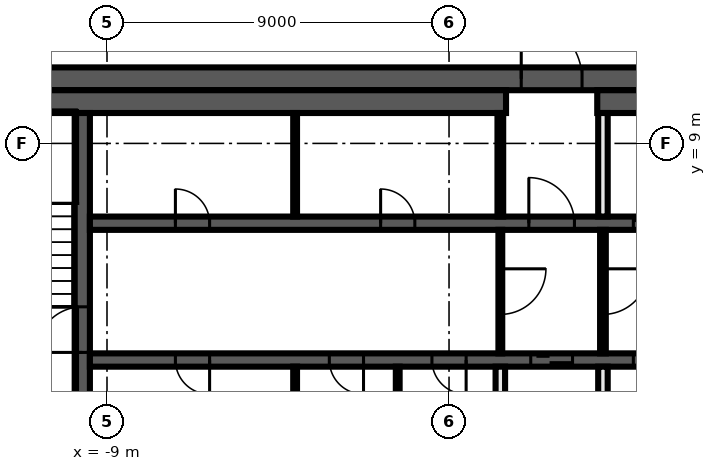
"""IFC4 building model, lengths in metres.
Left out: names, types, materials, properties, quantities, classifications, styles, units other than length and angle.
Written with IfcOpenShell. Run it as: python <this file> out.ifc"""

import sys

from ifc_helpers import new_model, si_unit, direction, frame, frame_2d, origin, place, context, subcontext, project, spatial, rectangle, extrude, element, fill, save


model = new_model("IFC4")
c1 = context("Model", 3, precision=1e-05, world=origin(), true_north=direction((0.0, 1.0)))
c2 = subcontext(c1, "Body", "Model", "MODEL_VIEW")
j1 = project(units=[si_unit("LENGTHUNIT", "METRE"), si_unit("PLANEANGLEUNIT", "RADIAN")], contexts=[c1])
p1 = place(None, origin())
s1 = spatial("IfcSite", under=j1, at=p1, CompositionType="ELEMENT")
p2 = place(p1, origin())
s2 = spatial("IfcBuilding", under=s1, at=p2, CompositionType="ELEMENT")
p3 = place(p2, frame((0.0, 0.0, 353.0)))
s3 = spatial("IfcBuildingStorey", under=s2, at=p3, CompositionType="ELEMENT", Elevation=353.0)
p4 = place(p3, frame((-14.0, 10.7, 0.0), z_axis=(0.0, 0.0, 1.0), x_axis=(1.0, 0.0, 0.0)))
e1 = element("IfcWall", 1, at=p4, inside=s3, PredefinedType="SHEAR", context=c2, shape_type="SweptSolid", body=[
    extrude(rectangle(XDim=28.0, YDim=0.6, at=frame_2d((14.0, 0.0))), origin(), (0.0, 0.0, 1.0), 5.6),
])
p5 = place(p4, frame((15.9, 0.0, 0.0)))
e2 = element("IfcOpeningElement", 2, at=p5, cuts=e1, PredefinedType="OPENING", context=c2, shape_type="SweptSolid", body=[
    extrude(rectangle(XDim=1.6, YDim=2.1, at=frame_2d((0.8, 1.05))), frame((0.0, 0.31, 0.0), z_axis=(0.0, -1.0, 0.0), x_axis=(1.0, 0.0, 0.0)), (0.0, 0.0, 1.0), 0.62),
])
p6 = place(p3, frame((-13.4, 10.1, 0.0), z_axis=(0.0, 0.0, 1.0), x_axis=(1.0, 0.0, 0.0)))
e3 = element("IfcWall", 3, at=p6, inside=s3, PredefinedType="SHEAR", context=c2, shape_type="SweptSolid", body=[
    extrude(rectangle(XDim=14.9, YDim=0.6, at=frame_2d((7.45, 0.0))), origin(), (0.0, 0.0, 1.0), 5.6),
])
p7 = place(p3, frame((3.9, 10.1, 0.0), z_axis=(0.0, 0.0, 1.0), x_axis=(1.0, 0.0, 0.0)))
e4 = element("IfcWall", 4, at=p7, inside=s3, PredefinedType="SHEAR", context=c2, shape_type="SweptSolid", body=[
    extrude(rectangle(XDim=9.5, YDim=0.6, at=frame_2d((4.75, 0.0))), origin(), (0.0, 0.0, 1.0), 5.6),
])
p8 = place(p3, frame((-9.65, 2.3, 0.0), z_axis=(0.0, 0.0, 1.0), x_axis=(0.0, 1.0, 0.0)))
e5 = element("IfcWall", 5, at=p8, inside=s3, PredefinedType="SHEAR", context=c2, shape_type="SweptSolid", body=[
    extrude(rectangle(XDim=7.5, YDim=0.4, at=frame_2d((3.75, 0.0))), origin(), (0.0, 0.0, 1.0), 5.6),
])
p9 = place(p8, frame((1.2, 0.0, 0.0)))
e6 = element("IfcOpeningElement", 6, at=p9, cuts=e5, PredefinedType="OPENING", context=c2, shape_type="SweptSolid", body=[
    extrude(rectangle(XDim=1.2, YDim=2.1, at=frame_2d((0.6, 1.05))), frame((0.0, 0.21, 0.0), z_axis=(0.0, -1.0, 0.0), x_axis=(1.0, 0.0, 0.0)), (0.0, 0.0, 1.0), 0.42),
])
p10 = place(p3, frame((-9.45, 6.9, 0.0), z_axis=(0.0, 0.0, 1.0), x_axis=(1.0, 0.0, 0.0)))
e7 = element("IfcWall", 7, at=p10, inside=s3, PredefinedType="SHEAR", context=c2, shape_type="SweptSolid", body=[
    extrude(rectangle(XDim=18.9, YDim=0.35, at=frame_2d((9.45, 0.0))), origin(), (0.0, 0.0, 1.0), 5.6),
])
p11 = place(p10, frame((11.55, 0.0, 0.0)))
e8 = element("IfcOpeningElement", 8, at=p11, cuts=e7, PredefinedType="OPENING", context=c2, shape_type="SweptSolid", body=[
    extrude(rectangle(XDim=1.2, YDim=2.1, at=frame_2d((0.6, 1.05))), frame((0.0, 0.185, 0.0), z_axis=(0.0, -1.0, 0.0), x_axis=(1.0, 0.0, 0.0)), (0.0, 0.0, 1.0), 0.37),
])
p12 = place(p10, frame((14.3, 0.0, 0.0)))
e9 = element("IfcOpeningElement", 9, at=p12, cuts=e7, PredefinedType="OPENING", context=c2, shape_type="SweptSolid", body=[
    extrude(rectangle(XDim=1.1, YDim=2.1, at=frame_2d((0.55, 1.05))), frame((0.0, 0.185, 0.0), z_axis=(0.0, -1.0, 0.0), x_axis=(1.0, 0.0, 0.0)), (0.0, 0.0, 1.0), 0.37),
])
p13 = place(p10, frame((17.0, 0.0, 0.0)))
e10 = element("IfcOpeningElement", 10, at=p13, cuts=e7, PredefinedType="OPENING", context=c2, shape_type="SweptSolid", body=[
    extrude(rectangle(XDim=1.1, YDim=2.1, at=frame_2d((0.55, 1.05))), frame((0.0, 0.185, 0.0), z_axis=(0.0, -1.0, 0.0), x_axis=(1.0, 0.0, 0.0)), (0.0, 0.0, 1.0), 0.37),
])
p14 = place(p10, frame((2.25, 0.0, 0.0)))
e11 = element("IfcOpeningElement", 11, at=p14, cuts=e7, PredefinedType="OPENING", context=c2, shape_type="SweptSolid", body=[
    extrude(rectangle(XDim=0.9, YDim=2.1, at=frame_2d((0.45, 1.05))), frame((0.0, 0.185, 0.0), z_axis=(0.0, -1.0, 0.0), x_axis=(1.0, 0.0, 0.0)), (0.0, 0.0, 1.0), 0.37),
])
p15 = place(p10, frame((7.65, 0.0, 0.0)))
e12 = element("IfcOpeningElement", 12, at=p15, cuts=e7, PredefinedType="OPENING", context=c2, shape_type="SweptSolid", body=[
    extrude(rectangle(XDim=0.9, YDim=2.1, at=frame_2d((0.45, 1.05))), frame((0.0, 0.185, 0.0), z_axis=(0.0, -1.0, 0.0), x_axis=(1.0, 0.0, 0.0)), (0.0, 0.0, 1.0), 0.37),
])
p16 = place(p3, frame((9.45, 3.3, 0.0), z_axis=(0.0, 0.0, 1.0), x_axis=(-1.0, 0.0, 0.0)))
e13 = element("IfcWall", 13, at=p16, inside=s3, PredefinedType="SHEAR", context=c2, shape_type="SweptSolid", body=[
    extrude(rectangle(XDim=18.9, YDim=0.35, at=frame_2d((9.45, 0.0))), origin(), (0.0, 0.0, 1.0), 5.6),
])
p17 = place(p16, frame((6.2, 0.0, 0.0)))
e14 = element("IfcOpeningElement", 14, at=p17, cuts=e13, PredefinedType="OPENING", context=c2, shape_type="SweptSolid", body=[
    extrude(rectangle(XDim=1.1, YDim=2.1, at=frame_2d((0.55, 1.05))), frame((0.0, 0.185, 0.0), z_axis=(0.0, -1.0, 0.0), x_axis=(1.0, 0.0, 0.0)), (0.0, 0.0, 1.0), 0.37),
])
p18 = place(p16, frame((3.5, 0.0, 0.0)))
e15 = element("IfcOpeningElement", 15, at=p18, cuts=e13, PredefinedType="OPENING", context=c2, shape_type="SweptSolid", body=[
    extrude(rectangle(XDim=1.1, YDim=2.1, at=frame_2d((0.55, 1.05))), frame((0.0, 0.185, 0.0), z_axis=(0.0, -1.0, 0.0), x_axis=(1.0, 0.0, 0.0)), (0.0, 0.0, 1.0), 0.37),
])
p19 = place(p16, frame((0.9, 0.0, 0.0)))
e16 = element("IfcOpeningElement", 16, at=p19, cuts=e13, PredefinedType="OPENING", context=c2, shape_type="SweptSolid", body=[
    extrude(rectangle(XDim=0.9, YDim=2.1, at=frame_2d((0.45, 1.05))), frame((0.0, 0.185, 0.0), z_axis=(0.0, -1.0, 0.0), x_axis=(1.0, 0.0, 0.0)), (0.0, 0.0, 1.0), 0.37),
])
p20 = place(p16, frame((15.75, 0.0, 0.0)))
e17 = element("IfcOpeningElement", 17, at=p20, cuts=e13, PredefinedType="OPENING", context=c2, shape_type="SweptSolid", body=[
    extrude(rectangle(XDim=0.9, YDim=2.1, at=frame_2d((0.45, 1.05))), frame((0.0, 0.185, 0.0), z_axis=(0.0, -1.0, 0.0), x_axis=(1.0, 0.0, 0.0)), (0.0, 0.0, 1.0), 0.37),
])
p21 = place(p16, frame((11.7, 0.0, 0.0)))
e18 = element("IfcOpeningElement", 18, at=p21, cuts=e13, PredefinedType="OPENING", context=c2, shape_type="SweptSolid", body=[
    extrude(rectangle(XDim=0.9, YDim=2.1, at=frame_2d((0.45, 1.05))), frame((0.0, 0.185, 0.0), z_axis=(0.0, -1.0, 0.0), x_axis=(1.0, 0.0, 0.0)), (0.0, 0.0, 1.0), 0.37),
])
p22 = place(p16, frame((9.0, 0.0, 0.0)))
e19 = element("IfcOpeningElement", 19, at=p22, cuts=e13, PredefinedType="OPENING", context=c2, shape_type="SweptSolid", body=[
    extrude(rectangle(XDim=0.9, YDim=2.1, at=frame_2d((0.45, 1.05))), frame((0.0, 0.185, 0.0), z_axis=(0.0, -1.0, 0.0), x_axis=(1.0, 0.0, 0.0)), (0.0, 0.0, 1.0), 0.37),
])
p23 = place(p3, frame((4.05, 6.725, 0.0), z_axis=(0.0, 0.0, 1.0), x_axis=(0.0, -1.0, 0.0)))
e20 = element("IfcWall", 20, at=p23, inside=s3, PredefinedType="PARTITIONING", context=c2, shape_type="SweptSolid", body=[
    extrude(rectangle(XDim=3.25, YDim=0.15, at=frame_2d((1.625, 0.0))), origin(), (0.0, 0.0, 1.0), 5.6),
])
p24 = place(p23, frame((1.025, 0.0, 0.0)))
e21 = element("IfcOpeningElement", 21, at=p24, cuts=e20, PredefinedType="OPENING", context=c2, shape_type="SweptSolid", body=[
    extrude(rectangle(XDim=1.2, YDim=2.1, at=frame_2d((0.6, 1.05))), frame((0.0, 0.085, 0.0), z_axis=(0.0, -1.0, 0.0), x_axis=(1.0, 0.0, 0.0)), (0.0, 0.0, 1.0), 0.17),
])
for number, where, z_axis, x_axis in (
    (22, (4.05, 0.4, 0.0), (0.0, 0.0, 1.0), (0.0, 1.0, 0.0)),
    (23, (4.05, 7.075, 0.0), (0.0, 0.0, 1.0), (0.0, 1.0, 0.0)),
):
    element("IfcWall", number, at=place(p3, frame(where, z_axis=z_axis, x_axis=x_axis)), inside=s3, PredefinedType="SOLIDWALL", context=c2, shape_type="SweptSolid", body=[
        extrude(rectangle(XDim=2.725, YDim=0.25, at=frame_2d((1.363, 0.0))), origin(), (0.0, 0.0, 1.0), 5.6),
    ])
p25 = place(p3, frame((1.35, 7.075, 0.0), z_axis=(0.0, 0.0, 1.0), x_axis=(0.0, 1.0, 0.0)))
e24 = element("IfcWall", 24, at=p25, inside=s3, PredefinedType="PARTITIONING", context=c2, shape_type="SweptSolid", body=[
    extrude(rectangle(XDim=2.725, YDim=0.15, at=frame_2d((1.363, 0.0))), origin(), (0.0, 0.0, 1.0), 5.6),
])
p26 = place(p3, frame((1.35, 6.725, 0.0), z_axis=(0.0, 0.0, 1.0), x_axis=(0.0, -1.0, 0.0)))
e25 = element("IfcWall", 25, at=p26, inside=s3, PredefinedType="PARTITIONING", context=c2, shape_type="SweptSolid", body=[
    extrude(rectangle(XDim=3.25, YDim=0.1, at=frame_2d((1.625, 0.0))), origin(), (0.0, 0.0, 1.0), 5.6),
])
p27 = place(p26, frame((1.025, 0.0, 0.0)))
e26 = element("IfcOpeningElement", 26, at=p27, cuts=e25, PredefinedType="OPENING", context=c2, shape_type="SweptSolid", body=[
    extrude(rectangle(XDim=1.2, YDim=2.1, at=frame_2d((0.6, 1.05))), frame((0.0, 0.06, 0.0), z_axis=(0.0, -1.0, 0.0), x_axis=(1.0, 0.0, 0.0)), (0.0, 0.0, 1.0), 0.12),
])
p28 = place(p3, frame((1.35, 0.4, 0.0), z_axis=(0.0, 0.0, 1.0), x_axis=(0.0, 1.0, 0.0)))
e27 = element("IfcWall", 27, at=p28, inside=s3, PredefinedType="SOLIDWALL", context=c2, shape_type="SweptSolid", body=[
    extrude(rectangle(XDim=2.725, YDim=0.25, at=frame_2d((1.363, 0.0))), origin(), (0.0, 0.0, 1.0), 5.6),
])
for number, where, z_axis, x_axis in (
    (28, (-1.35, 0.4, 0.0), (0.0, 0.0, 1.0), (0.0, 1.0, 0.0)),
    (29, (-4.05, 0.4, 0.0), (0.0, 0.0, 1.0), (0.0, 1.0, 0.0)),
    (30, (-4.05, 7.075, 0.0), (0.0, 0.0, 1.0), (0.0, 1.0, 0.0)),
):
    element("IfcWall", number, at=place(p3, frame(where, z_axis=z_axis, x_axis=x_axis)), inside=s3, PredefinedType="PARTITIONING", context=c2, shape_type="SweptSolid", body=[
        extrude(rectangle(XDim=2.725, YDim=0.1, at=frame_2d((1.363, 0.0))), origin(), (0.0, 0.0, 1.0), 5.6),
    ])
p29 = place(p5, origin())
e31 = element("IfcDoor", 31, at=p29, inside=s3, OperationType="DOUBLE_DOOR_SINGLE_SWING", PredefinedType="DOOR", context=c2, shape_type="SweptSolid", body=[
    extrude(rectangle(XDim=1.6, YDim=2.1, at=frame_2d((0.8, 1.05))), frame((0.0, 0.025, 0.0), z_axis=(0.0, -1.0, 0.0), x_axis=(1.0, 0.0, 0.0)), (0.0, 0.0, 1.0), 0.05),
])
fill(e2, e31)
p30 = place(p11, origin())
e32 = element("IfcDoor", 32, at=p30, inside=s3, OperationType="SINGLE_SWING_LEFT", PredefinedType="DOOR", context=c2, shape_type="SweptSolid", body=[
    extrude(rectangle(XDim=1.2, YDim=2.1, at=frame_2d((0.6, 1.05))), frame((0.0, 0.025, 0.0), z_axis=(0.0, -1.0, 0.0), x_axis=(1.0, 0.0, 0.0)), (0.0, 0.0, 1.0), 0.05),
])
fill(e8, e32)
p31 = place(p12, origin())
e33 = element("IfcDoor", 33, at=p31, inside=s3, OperationType="DOUBLE_DOOR_SLIDING", PredefinedType="DOOR", context=c2, shape_type="SweptSolid", body=[
    extrude(rectangle(XDim=1.1, YDim=2.1, at=frame_2d((0.55, 1.05))), frame((0.0, 0.025, 0.0), z_axis=(0.0, -1.0, 0.0), x_axis=(1.0, 0.0, 0.0)), (0.0, 0.0, 1.0), 0.05),
])
fill(e9, e33)
p32 = place(p17, origin())
e34 = element("IfcDoor", 34, at=p32, inside=s3, OperationType="DOUBLE_DOOR_SLIDING", PredefinedType="DOOR", context=c2, shape_type="SweptSolid", body=[
    extrude(rectangle(XDim=1.1, YDim=2.1, at=frame_2d((0.55, 1.05))), frame((0.0, 0.025, 0.0), z_axis=(0.0, -1.0, 0.0), x_axis=(1.0, 0.0, 0.0)), (0.0, 0.0, 1.0), 0.05),
])
fill(e14, e34)
p33 = place(p18, origin())
e35 = element("IfcDoor", 35, at=p33, inside=s3, OperationType="DOUBLE_DOOR_SLIDING", PredefinedType="DOOR", context=c2, shape_type="SweptSolid", body=[
    extrude(rectangle(XDim=1.1, YDim=2.1, at=frame_2d((0.55, 1.05))), frame((0.0, 0.025, 0.0), z_axis=(0.0, -1.0, 0.0), x_axis=(1.0, 0.0, 0.0)), (0.0, 0.0, 1.0), 0.05),
])
fill(e15, e35)
p34 = place(p14, origin())
e36 = element("IfcDoor", 36, at=p34, inside=s3, OperationType="SINGLE_SWING_RIGHT", PredefinedType="DOOR", context=c2, shape_type="SweptSolid", body=[
    extrude(rectangle(XDim=0.9, YDim=2.1, at=frame_2d((0.45, 1.05))), frame((0.0, 0.025, 0.0), z_axis=(0.0, -1.0, 0.0), x_axis=(1.0, 0.0, 0.0)), (0.0, 0.0, 1.0), 0.05),
])
fill(e11, e36)
p35 = place(p15, origin())
e37 = element("IfcDoor", 37, at=p35, inside=s3, OperationType="SINGLE_SWING_LEFT", PredefinedType="DOOR", context=c2, shape_type="SweptSolid", body=[
    extrude(rectangle(XDim=0.9, YDim=2.1, at=frame_2d((0.45, 1.05))), frame((0.0, 0.025, 0.0), z_axis=(0.0, -1.0, 0.0), x_axis=(1.0, 0.0, 0.0)), (0.0, 0.0, 1.0), 0.05),
])
fill(e12, e37)
p36 = place(p20, origin())
e38 = element("IfcDoor", 38, at=p36, inside=s3, OperationType="SINGLE_SWING_RIGHT", PredefinedType="DOOR", context=c2, shape_type="SweptSolid", body=[
    extrude(rectangle(XDim=0.9, YDim=2.1, at=frame_2d((0.45, 1.05))), frame((0.0, 0.025, 0.0), z_axis=(0.0, -1.0, 0.0), x_axis=(1.0, 0.0, 0.0)), (0.0, 0.0, 1.0), 0.05),
])
fill(e17, e38)
p37 = place(p21, origin())
e39 = element("IfcDoor", 39, at=p37, inside=s3, OperationType="SINGLE_SWING_LEFT", PredefinedType="DOOR", context=c2, shape_type="SweptSolid", body=[
    extrude(rectangle(XDim=0.9, YDim=2.1, at=frame_2d((0.45, 1.05))), frame((0.0, 0.025, 0.0), z_axis=(0.0, -1.0, 0.0), x_axis=(1.0, 0.0, 0.0)), (0.0, 0.0, 1.0), 0.05),
])
fill(e18, e39)
p38 = place(p22, origin())
e40 = element("IfcDoor", 40, at=p38, inside=s3, OperationType="SINGLE_SWING_RIGHT", PredefinedType="DOOR", context=c2, shape_type="SweptSolid", body=[
    extrude(rectangle(XDim=0.9, YDim=2.1, at=frame_2d((0.45, 1.05))), frame((0.0, 0.025, 0.0), z_axis=(0.0, -1.0, 0.0), x_axis=(1.0, 0.0, 0.0)), (0.0, 0.0, 1.0), 0.05),
])
fill(e19, e40)
p39 = place(p9, origin())
e41 = element("IfcDoor", 41, at=p39, inside=s3, OperationType="SINGLE_SWING_RIGHT", PredefinedType="DOOR", context=c2, shape_type="SweptSolid", body=[
    extrude(rectangle(XDim=1.2, YDim=2.1, at=frame_2d((0.6, 1.05))), frame((0.0, 0.025, 0.0), z_axis=(0.0, -1.0, 0.0), x_axis=(1.0, 0.0, 0.0)), (0.0, 0.0, 1.0), 0.05),
])
fill(e6, e41)
p40 = place(p27, origin())
e42 = element("IfcDoor", 42, at=p40, inside=s3, OperationType="SINGLE_SWING_LEFT", PredefinedType="DOOR", context=c2, shape_type="SweptSolid", body=[
    extrude(rectangle(XDim=1.2, YDim=2.1, at=frame_2d((0.6, 1.05))), frame((0.0, 0.025, 0.0), z_axis=(0.0, -1.0, 0.0), x_axis=(1.0, 0.0, 0.0)), (0.0, 0.0, 1.0), 0.05),
])
fill(e26, e42)
p41 = place(p24, origin())
e43 = element("IfcDoor", 43, at=p41, inside=s3, OperationType="SINGLE_SWING_RIGHT", PredefinedType="DOOR", context=c2, shape_type="SweptSolid", body=[
    extrude(rectangle(XDim=1.2, YDim=2.1, at=frame_2d((0.6, 1.05))), frame((0.0, 0.025, 0.0), z_axis=(0.0, -1.0, 0.0), x_axis=(1.0, 0.0, 0.0)), (0.0, 0.0, 1.0), 0.05),
])
fill(e21, e43)
save(model, sys.argv[1])
